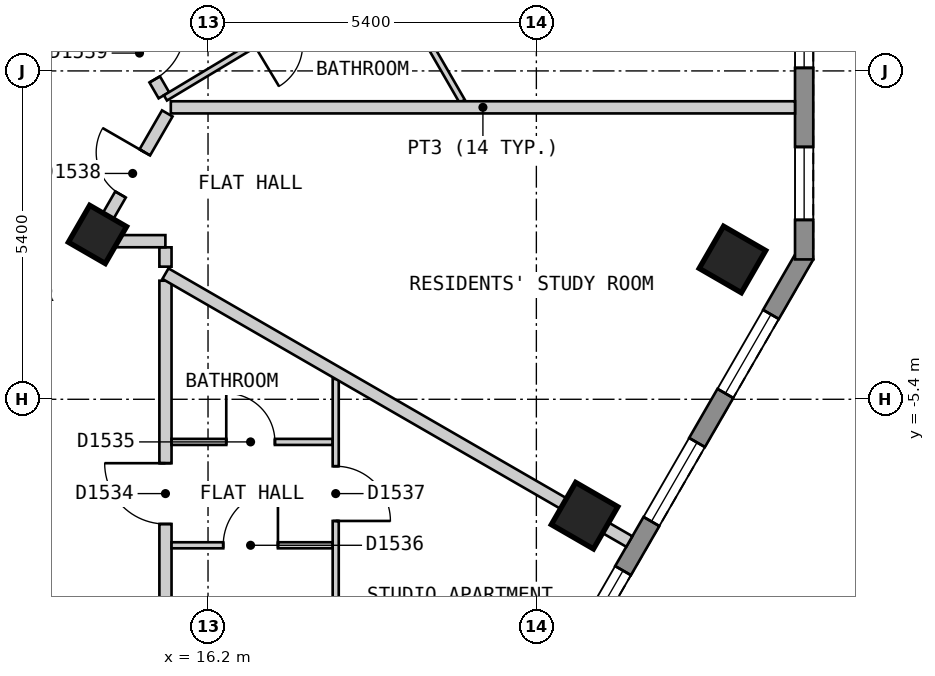
"""IFC4 building model, lengths in metres.
Left out: names, types, materials, properties, quantities, classifications, styles, units other than length and angle.
Written with IfcOpenShell. Run it as: python <this file> out.ifc"""

import sys

from ifc_helpers import new_model, si_unit, direction, frame, frame_2d, origin, origin_2d, place, context, subcontext, project, spatial, polyline, rectangle, outline, extrude, element, fill, save


model = new_model("IFC4")
c1 = context("Model", 3, precision=1e-05, world=origin(), true_north=direction((0.0, 1.0)))
c2 = subcontext(c1, "Body", "Model", "MODEL_VIEW")
j1 = project(units=[si_unit("LENGTHUNIT", "METRE"), si_unit("PLANEANGLEUNIT", "RADIAN")], contexts=[c1])
p1 = place(None, origin())
s1 = spatial("IfcSite", under=j1, at=p1, CompositionType="ELEMENT")
p2 = place(p1, origin())
s2 = spatial("IfcBuilding", under=s1, at=p2, CompositionType="ELEMENT")
p3 = place(p2, frame((0.0, 0.0, 196.2)))
s3 = spatial("IfcBuildingStorey", under=s2, at=p3, CompositionType="ELEMENT", Elevation=196.2)
for number, where, z_axis, x_axis in (
    (1, (22.393, -7.314, 0.0), (0.0, 0.0, 1.0), (0.5, 0.866, 0.0)),
    (2, (24.825, -3.101, 0.0), (0.0, 0.0, 1.0), (0.5, 0.866, 0.0)),
):
    element("IfcColumn", number, at=place(p3, frame(where, z_axis=z_axis, x_axis=x_axis)), inside=s3, PredefinedType="COLUMN", context=c2, shape_type="SweptSolid", body=[
        extrude(rectangle(XDim=0.8, YDim=0.8, at=origin_2d()), origin(), (0.0, 0.0, 1.0), 3.0),
    ])
p4 = place(p3, frame((14.382, -2.689, 0.0), z_axis=(0.0, 0.0, 1.0), x_axis=(0.5, 0.866025403784, 0.0)))
e3 = element("IfcColumn", 3, at=p4, inside=s3, PredefinedType="COLUMN", context=c2, shape_type="SweptSolid", body=[
    extrude(rectangle(XDim=0.7, YDim=0.7, at=origin_2d()), origin(), (0.0, 0.0, 1.0), 3.0),
])
p5 = place(p3, frame((15.631, -21.025, 0.0), z_axis=(0.0, 0.0, 1.0), x_axis=(0.500018670445, 0.86601462413, 0.0)))
e4 = element("IfcWall", 4, at=p5, inside=s3, PredefinedType="SOLIDWALL", context=c2, shape_type="SweptSolid", body=[
    extrude(outline(polyline([(0.0, -0.15), (20.785, -0.15), (20.705, 0.15), (0.08, 0.15), (0.0, -0.15)])), origin(), (0.0, 0.0, 1.0), 2.6),
])
p6 = place(p5, frame((1.13, 0.0, 0.15)))
e5 = element("IfcOpeningElement", 5, at=p6, cuts=e4, PredefinedType="OPENING", context=c2, shape_type="SweptSolid", body=[
    extrude(rectangle(XDim=1.5, YDim=2.1, at=frame_2d((0.75, 1.05))), frame((0.0, 0.16, 0.0), z_axis=(0.0, -1.0, 0.0), x_axis=(1.0, 0.0, 0.0)), (0.0, 0.0, 1.0), 0.32),
])
p7 = place(p5, frame((3.562, 0.0, 0.15)))
e6 = element("IfcOpeningElement", 6, at=p7, cuts=e4, PredefinedType="OPENING", context=c2, shape_type="SweptSolid", body=[
    extrude(rectangle(XDim=1.5, YDim=2.1, at=frame_2d((0.75, 1.05))), frame((0.0, 0.16, 0.0), z_axis=(0.0, -1.0, 0.0), x_axis=(1.0, 0.0, 0.0)), (0.0, 0.0, 1.0), 0.32),
])
p8 = place(p5, frame((5.994, 0.0, 0.15)))
e7 = element("IfcOpeningElement", 7, at=p8, cuts=e4, PredefinedType="OPENING", context=c2, shape_type="SweptSolid", body=[
    extrude(rectangle(XDim=1.5, YDim=2.1, at=frame_2d((0.75, 1.05))), frame((0.0, 0.16, 0.0), z_axis=(0.0, -1.0, 0.0), x_axis=(1.0, 0.0, 0.0)), (0.0, 0.0, 1.0), 0.32),
])
p9 = place(p5, frame((8.425, 0.0, 0.15)))
e8 = element("IfcOpeningElement", 8, at=p9, cuts=e4, PredefinedType="OPENING", context=c2, shape_type="SweptSolid", body=[
    extrude(rectangle(XDim=1.5, YDim=2.1, at=frame_2d((0.75, 1.05))), frame((0.0, 0.16, 0.0), z_axis=(0.0, -1.0, 0.0), x_axis=(1.0, 0.0, 0.0)), (0.0, 0.0, 1.0), 0.32),
])
p10 = place(p5, frame((10.857, 0.0, 0.15)))
e9 = element("IfcOpeningElement", 9, at=p10, cuts=e4, PredefinedType="OPENING", context=c2, shape_type="SweptSolid", body=[
    extrude(rectangle(XDim=1.5, YDim=2.1, at=frame_2d((0.75, 1.05))), frame((0.0, 0.16, 0.0), z_axis=(0.0, -1.0, 0.0), x_axis=(1.0, 0.0, 0.0)), (0.0, 0.0, 1.0), 0.32),
])
p11 = place(p5, frame((13.289, 0.0, 0.15)))
e10 = element("IfcOpeningElement", 10, at=p11, cuts=e4, PredefinedType="OPENING", context=c2, shape_type="SweptSolid", body=[
    extrude(rectangle(XDim=1.5, YDim=2.1, at=frame_2d((0.75, 1.05))), frame((0.0, 0.16, 0.0), z_axis=(0.0, -1.0, 0.0), x_axis=(1.0, 0.0, 0.0)), (0.0, 0.0, 1.0), 0.32),
])
p12 = place(p5, frame((15.722, 0.0, 0.15)))
e11 = element("IfcOpeningElement", 11, at=p12, cuts=e4, PredefinedType="OPENING", context=c2, shape_type="SweptSolid", body=[
    extrude(rectangle(XDim=1.5, YDim=2.1, at=frame_2d((0.75, 1.05))), frame((0.0, 0.16, 0.0), z_axis=(0.0, -1.0, 0.0), x_axis=(1.0, 0.0, 0.0)), (0.0, 0.0, 1.0), 0.32),
])
p13 = place(p5, frame((18.154, 0.0, 0.15)))
e12 = element("IfcOpeningElement", 12, at=p13, cuts=e4, PredefinedType="OPENING", context=c2, shape_type="SweptSolid", body=[
    extrude(rectangle(XDim=1.5, YDim=2.1, at=frame_2d((0.75, 1.05))), frame((0.0, 0.16, 0.0), z_axis=(0.0, -1.0, 0.0), x_axis=(1.0, 0.0, 0.0)), (0.0, 0.0, 1.0), 0.32),
])
p14 = place(p3, frame((26.004, -3.1, 0.0), z_axis=(0.0, 0.0, 1.0), x_axis=(0.0, 1.0, 0.0)))
e13 = element("IfcWall", 13, at=p14, inside=s3, PredefinedType="SOLIDWALL", context=c2, shape_type="SweptSolid", body=[
    extrude(outline(polyline([(0.0, -0.15), (5.0, -0.15), (4.92, 0.15), (0.08, 0.15), (0.0, -0.15)])), origin(), (0.0, 0.0, 1.0), 2.6),
])
p15 = place(p14, frame((0.65, 0.0, 0.15)))
e14 = element("IfcOpeningElement", 14, at=p15, cuts=e13, PredefinedType="OPENING", context=c2, shape_type="SweptSolid", body=[
    extrude(rectangle(XDim=1.2, YDim=2.1, at=frame_2d((0.6, 1.05))), frame((0.0, 0.16, 0.0), z_axis=(0.0, -1.0, 0.0), x_axis=(1.0, 0.0, 0.0)), (0.0, 0.0, 1.0), 0.32),
])
p16 = place(p14, frame((3.15, 0.0, 0.15)))
e15 = element("IfcOpeningElement", 15, at=p16, cuts=e13, PredefinedType="OPENING", context=c2, shape_type="SweptSolid", body=[
    extrude(rectangle(XDim=1.2, YDim=2.1, at=frame_2d((0.6, 1.05))), frame((0.0, 0.16, 0.0), z_axis=(0.0, -1.0, 0.0), x_axis=(1.0, 0.0, 0.0)), (0.0, 0.0, 1.0), 0.32),
])
p17 = place(p3, frame((10.739, 7.8, 0.0), z_axis=(0.0, 0.0, 1.0), x_axis=(0.500023726918, -0.866011704609, 0.0)))
e16 = element("IfcWall", 16, at=p17, inside=s3, PredefinedType="PARTITIONING", context=c2, shape_type="SweptSolid", body=[
    extrude(rectangle(XDim=9.47, YDim=0.2, at=frame_2d((4.735, 0.0))), origin(), (0.0, 0.0, 1.0), 2.6),
])
p18 = place(p17, frame((8.168, 0.0, 0.0)))
e17 = element("IfcOpeningElement", 17, at=p18, cuts=e16, PredefinedType="OPENING", context=c2, shape_type="SweptSolid", body=[
    extrude(rectangle(XDim=1.0, YDim=2.1, at=frame_2d((0.5, 1.05))), frame((0.0, 0.11, 0.0), z_axis=(0.0, -1.0, 0.0), x_axis=(1.0, 0.0, 0.0)), (0.0, 0.0, 1.0), 0.22),
])
p19 = place(p17, frame((3.578, 0.0, 0.0)))
e18 = element("IfcOpeningElement", 18, at=p19, cuts=e16, PredefinedType="OPENING", context=c2, shape_type="SweptSolid", body=[
    extrude(rectangle(XDim=1.0, YDim=2.1, at=frame_2d((0.5, 1.05))), frame((0.0, 0.11, 0.0), z_axis=(0.0, -1.0, 0.0), x_axis=(1.0, 0.0, 0.0)), (0.0, 0.0, 1.0), 0.22),
])
p20 = place(p3, frame((15.5, -2.901, 0.0), z_axis=(0.0, 0.0, 1.0), x_axis=(0.0, -1.0, 0.0)))
e19 = element("IfcWall", 19, at=p20, inside=s3, PredefinedType="PARTITIONING", context=c2, shape_type="SweptSolid", body=[
    extrude(rectangle(XDim=0.318, YDim=0.2, at=frame_2d((0.159, 0.0))), origin(), (0.0, 0.0, 1.0), 2.6),
])
p21 = place(p3, frame((14.433, -2.8, 0.0), z_axis=(0.0, 0.0, 1.0), x_axis=(1.0, 0.0, 0.0)))
e20 = element("IfcWall", 20, at=p21, inside=s3, PredefinedType="PARTITIONING", context=c2, shape_type="SweptSolid", body=[
    extrude(rectangle(XDim=1.066, YDim=0.2, at=frame_2d((0.533, 0.0))), origin(), (0.0, 0.0, 1.0), 2.6),
])
p22 = place(p3, frame((14.318, -2.8, 0.0), z_axis=(0.0, 0.0, 1.0), x_axis=(0.49964693309, 0.866229151122, 0.0)))
e21 = element("IfcWall", 21, at=p22, inside=s3, PredefinedType="PARTITIONING", context=c2, shape_type="SweptSolid", body=[
    extrude(rectangle(XDim=2.426, YDim=0.2, at=frame_2d((1.213, 0.0))), origin(), (0.0, 0.0, 1.0), 2.6),
])
p23 = place(p22, frame((0.886, 0.0, 0.0)))
e22 = element("IfcOpeningElement", 22, at=p23, cuts=e21, PredefinedType="OPENING", context=c2, shape_type="SweptSolid", body=[
    extrude(rectangle(XDim=0.8, YDim=2.1, at=frame_2d((0.4, 1.05))), frame((0.0, 0.11, 0.0), z_axis=(0.0, -1.0, 0.0), x_axis=(1.0, 0.0, 0.0)), (0.0, 0.0, 1.0), 0.22),
])
p24 = place(p3, frame((15.5, -18.799, 0.0), z_axis=(0.0, 0.0, 1.0), x_axis=(0.0, 1.0, 0.0)))
e23 = element("IfcWall", 23, at=p24, inside=s3, PredefinedType="PARTITIONING", context=c2, shape_type="SweptSolid", body=[
    extrude(rectangle(XDim=15.349, YDim=0.2, at=frame_2d((7.675, 0.0))), origin(), (0.0, 0.0, 1.0), 2.6),
])
p25 = place(p24, frame((4.477, 0.0, 0.0)))
e24 = element("IfcOpeningElement", 24, at=p25, cuts=e23, PredefinedType="OPENING", context=c2, shape_type="SweptSolid", body=[
    extrude(rectangle(XDim=0.8, YDim=2.1, at=frame_2d((0.4, 1.05))), frame((0.0, 0.11, 0.0), z_axis=(0.0, -1.0, 0.0), x_axis=(1.0, 0.0, 0.0)), (0.0, 0.0, 1.0), 0.22),
])
p26 = place(p24, frame((11.348, 0.0, 0.0)))
e25 = element("IfcOpeningElement", 25, at=p26, cuts=e23, PredefinedType="OPENING", context=c2, shape_type="SweptSolid", body=[
    extrude(rectangle(XDim=1.0, YDim=2.1, at=frame_2d((0.5, 1.05))), frame((0.0, 0.11, 0.0), z_axis=(0.0, -1.0, 0.0), x_axis=(1.0, 0.0, 0.0)), (0.0, 0.0, 1.0), 0.22),
])
p27 = place(p3, frame((19.75, 0.592, 0.0), z_axis=(0.0, 0.0, 1.0), x_axis=(0.499974077718, -0.866040369504, 0.0)))
e26 = element("IfcWall", 26, at=p27, inside=s3, PredefinedType="PARTITIONING", context=c2, shape_type="SweptSolid", body=[
    extrude(rectangle(XDim=1.26, YDim=0.1, at=frame_2d((0.63, 0.0))), origin(), (0.0, 0.0, 1.0), 2.6),
])
p28 = place(p3, frame((15.6, -6.101, 0.0), z_axis=(0.0, 0.0, 1.0), x_axis=(1.0, 0.0, 0.0)))
e27 = element("IfcWall", 27, at=p28, inside=s3, PredefinedType="PARTITIONING", context=c2, shape_type="SweptSolid", body=[
    extrude(rectangle(XDim=2.65, YDim=0.1, at=frame_2d((1.325, 0.0))), origin(), (0.0, 0.0, 1.0), 2.6),
])
p29 = place(p28, frame((0.9, 0.0, 0.0)))
e28 = element("IfcOpeningElement", 28, at=p29, cuts=e27, PredefinedType="OPENING", context=c2, shape_type="SweptSolid", body=[
    extrude(rectangle(XDim=0.8, YDim=2.1, at=frame_2d((0.4, 1.05))), frame((0.0, 0.06, 0.0), z_axis=(0.0, -1.0, 0.0), x_axis=(1.0, 0.0, 0.0)), (0.0, 0.0, 1.0), 0.12),
])
p30 = place(p3, frame((15.6, -7.801, 0.0), z_axis=(0.0, 0.0, 1.0), x_axis=(1.0, 0.0, 0.0)))
e29 = element("IfcWall", 29, at=p30, inside=s3, PredefinedType="PARTITIONING", context=c2, shape_type="SweptSolid", body=[
    extrude(rectangle(XDim=2.65, YDim=0.1, at=frame_2d((1.325, 0.0))), origin(), (0.0, 0.0, 1.0), 2.6),
])
p31 = place(p30, frame((0.85, 0.0, 0.0)))
e30 = element("IfcOpeningElement", 30, at=p31, cuts=e29, PredefinedType="OPENING", context=c2, shape_type="SweptSolid", body=[
    extrude(rectangle(XDim=0.9, YDim=2.1, at=frame_2d((0.45, 1.05))), frame((0.0, 0.06, 0.0), z_axis=(0.0, -1.0, 0.0), x_axis=(1.0, 0.0, 0.0)), (0.0, 0.0, 1.0), 0.12),
])
p32 = place(p3, frame((18.3, -10.452, 0.0), z_axis=(0.0, 0.0, 1.0), x_axis=(0.0, 1.0, 0.0)))
e31 = element("IfcWall", 31, at=p32, inside=s3, PredefinedType="PARTITIONING", context=c2, shape_type="SweptSolid", body=[
    extrude(rectangle(XDim=5.386, YDim=0.1, at=frame_2d((2.693, 0.0))), origin(), (0.0, 0.0, 1.0), 2.6),
])
p33 = place(p32, frame((3.051, 0.0, 0.0)))
e32 = element("IfcOpeningElement", 32, at=p33, cuts=e31, PredefinedType="OPENING", context=c2, shape_type="SweptSolid", body=[
    extrude(rectangle(XDim=0.9, YDim=2.1, at=frame_2d((0.45, 1.05))), frame((0.0, 0.06, 0.0), z_axis=(0.0, -1.0, 0.0), x_axis=(1.0, 0.0, 0.0)), (0.0, 0.0, 1.0), 0.12),
])
p34 = place(p3, frame((15.499, -0.444, 0.0), z_axis=(0.0, 0.0, 1.0), x_axis=(0.857061798163, 0.515213619899, 0.0)))
e33 = element("IfcWall", 33, at=p34, inside=s3, PredefinedType="PARTITIONING", context=c2, shape_type="SweptSolid", body=[
    extrude(rectangle(XDim=4.15, YDim=0.1, at=frame_2d((2.075, 0.0))), origin(), (0.0, 0.0, 1.0), 2.6),
])
p35 = place(p34, frame((1.7, 0.0, 0.0)))
e34 = element("IfcOpeningElement", 34, at=p35, cuts=e33, PredefinedType="OPENING", context=c2, shape_type="SweptSolid", body=[
    extrude(rectangle(XDim=0.8, YDim=2.1, at=frame_2d((0.4, 1.05))), frame((0.0, 0.06, 0.0), z_axis=(0.0, -1.0, 0.0), x_axis=(1.0, 0.0, 0.0)), (0.0, 0.0, 1.0), 0.12),
])
p36 = place(p3, frame((15.5, -3.334, 0.0), z_axis=(0.0, 0.0, 1.0), x_axis=(0.866001896501, -0.5000407136, 0.0)))
e35 = element("IfcWall", 35, at=p36, inside=s3, PredefinedType="PARTITIONING", context=c2, shape_type="SweptSolid", body=[
    extrude(rectangle(XDim=8.809, YDim=0.2, at=frame_2d((4.405, 0.0))), origin(), (0.0, 0.0, 1.0), 2.6),
])
p37 = place(p3, frame((15.588, -0.599, 0.0), z_axis=(0.0, 0.0, 1.0), x_axis=(1.0, 0.0, 0.0)))
e36 = element("IfcWall", 36, at=p37, inside=s3, PredefinedType="PARTITIONING", context=c2, shape_type="SweptSolid", body=[
    extrude(rectangle(XDim=10.266, YDim=0.2, at=frame_2d((5.133, 0.0))), origin(), (0.0, 0.0, 1.0), 2.6),
])
p38 = place(p11, origin())
e37 = element("IfcWindow", 37, at=p38, inside=s3, PartitioningType="SINGLE_PANEL", PredefinedType="WINDOW", context=c2, shape_type="SweptSolid", body=[
    extrude(rectangle(XDim=1.5, YDim=2.1, at=frame_2d((0.75, 1.05))), frame((0.0, 0.03, 0.0), z_axis=(0.0, -1.0, 0.0), x_axis=(1.0, 0.0, 0.0)), (0.0, 0.0, 1.0), 0.06),
])
fill(e10, e37)
p39 = place(p12, origin())
e38 = element("IfcWindow", 38, at=p39, inside=s3, PartitioningType="SINGLE_PANEL", PredefinedType="WINDOW", context=c2, shape_type="SweptSolid", body=[
    extrude(rectangle(XDim=1.5, YDim=2.1, at=frame_2d((0.75, 1.05))), frame((0.0, 0.03, 0.0), z_axis=(0.0, -1.0, 0.0), x_axis=(1.0, 0.0, 0.0)), (0.0, 0.0, 1.0), 0.06),
])
fill(e11, e38)
p40 = place(p13, origin())
e39 = element("IfcWindow", 39, at=p40, inside=s3, PartitioningType="SINGLE_PANEL", PredefinedType="WINDOW", context=c2, shape_type="SweptSolid", body=[
    extrude(rectangle(XDim=1.5, YDim=2.1, at=frame_2d((0.75, 1.05))), frame((0.0, 0.03, 0.0), z_axis=(0.0, -1.0, 0.0), x_axis=(1.0, 0.0, 0.0)), (0.0, 0.0, 1.0), 0.06),
])
fill(e12, e39)
p41 = place(p15, origin())
e40 = element("IfcWindow", 40, at=p41, inside=s3, PartitioningType="SINGLE_PANEL", PredefinedType="WINDOW", context=c2, shape_type="SweptSolid", body=[
    extrude(rectangle(XDim=1.2, YDim=2.1, at=frame_2d((0.6, 1.05))), frame((0.0, 0.03, 0.0), z_axis=(0.0, -1.0, 0.0), x_axis=(1.0, 0.0, 0.0)), (0.0, 0.0, 1.0), 0.06),
])
fill(e14, e40)
p42 = place(p16, origin())
e41 = element("IfcWindow", 41, at=p42, inside=s3, PartitioningType="SINGLE_PANEL", PredefinedType="WINDOW", context=c2, shape_type="SweptSolid", body=[
    extrude(rectangle(XDim=1.2, YDim=2.1, at=frame_2d((0.6, 1.05))), frame((0.0, 0.03, 0.0), z_axis=(0.0, -1.0, 0.0), x_axis=(1.0, 0.0, 0.0)), (0.0, 0.0, 1.0), 0.06),
])
fill(e15, e41)
p43 = place(p26, origin())
e42 = element("IfcDoor", 42, at=p43, inside=s3, OperationType="SINGLE_SWING_RIGHT", PredefinedType="DOOR", context=c2, shape_type="SweptSolid", body=[
    extrude(rectangle(XDim=1.0, YDim=2.1, at=frame_2d((0.5, 1.05))), frame((0.0, 0.025, 0.0), z_axis=(0.0, -1.0, 0.0), x_axis=(1.0, 0.0, 0.0)), (0.0, 0.0, 1.0), 0.05),
])
fill(e25, e42)
p44 = place(p29, origin())
e43 = element("IfcDoor", 43, at=p44, inside=s3, OperationType="SINGLE_SWING_LEFT", PredefinedType="DOOR", context=c2, shape_type="SweptSolid", body=[
    extrude(rectangle(XDim=0.8, YDim=2.1, at=frame_2d((0.4, 1.05))), frame((0.0, 0.025, 0.0), z_axis=(0.0, -1.0, 0.0), x_axis=(1.0, 0.0, 0.0)), (0.0, 0.0, 1.0), 0.05),
])
fill(e28, e43)
p45 = place(p31, origin())
e44 = element("IfcDoor", 44, at=p45, inside=s3, OperationType="SINGLE_SWING_RIGHT", PredefinedType="DOOR", context=c2, shape_type="SweptSolid", body=[
    extrude(rectangle(XDim=0.9, YDim=2.1, at=frame_2d((0.45, 1.05))), frame((0.0, 0.025, 0.0), z_axis=(0.0, -1.0, 0.0), x_axis=(1.0, 0.0, 0.0)), (0.0, 0.0, 1.0), 0.05),
])
fill(e30, e44)
p46 = place(p33, origin())
e45 = element("IfcDoor", 45, at=p46, inside=s3, OperationType="SINGLE_SWING_LEFT", PredefinedType="DOOR", context=c2, shape_type="SweptSolid", body=[
    extrude(rectangle(XDim=0.9, YDim=2.1, at=frame_2d((0.45, 1.05))), frame((0.0, 0.025, 0.0), z_axis=(0.0, -1.0, 0.0), x_axis=(1.0, 0.0, 0.0)), (0.0, 0.0, 1.0), 0.05),
])
fill(e32, e45)
p47 = place(p23, origin())
e46 = element("IfcDoor", 46, at=p47, inside=s3, OperationType="SINGLE_SWING_RIGHT", PredefinedType="DOOR", context=c2, shape_type="SweptSolid", body=[
    extrude(rectangle(XDim=0.8, YDim=2.1, at=frame_2d((0.4, 1.05))), frame((0.0, 0.025, 0.0), z_axis=(0.0, -1.0, 0.0), x_axis=(1.0, 0.0, 0.0)), (0.0, 0.0, 1.0), 0.05),
])
fill(e22, e46)
p48 = place(p18, origin())
e47 = element("IfcDoor", 47, at=p48, inside=s3, OperationType="SINGLE_SWING_LEFT", PredefinedType="DOOR", context=c2, shape_type="SweptSolid", body=[
    extrude(rectangle(XDim=1.0, YDim=2.1, at=frame_2d((0.5, 1.05))), frame((0.0, 0.025, 0.0), z_axis=(0.0, -1.0, 0.0), x_axis=(1.0, 0.0, 0.0)), (0.0, 0.0, 1.0), 0.05),
])
fill(e17, e47)
save(model, sys.argv[1])
